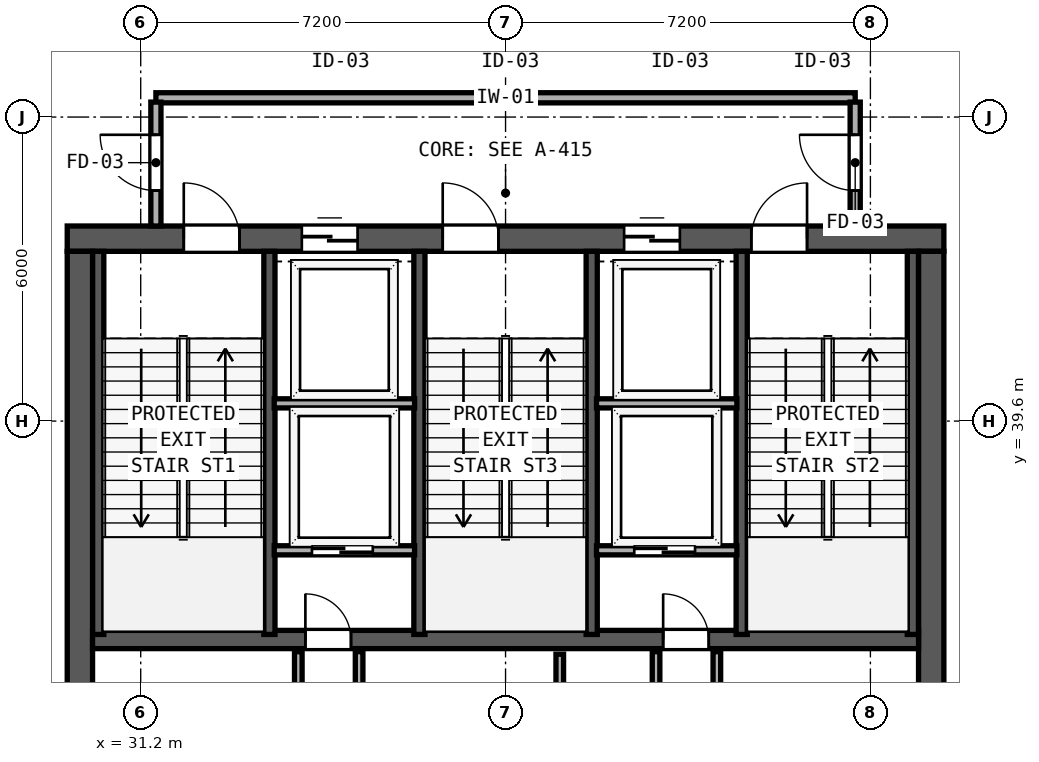
"""IFC4 building model, lengths in metres.
Left out: names, types, materials, properties, quantities, classifications, styles, units other than length and angle.
Written with IfcOpenShell. Run it as: python <this file> out.ifc"""

import sys

from ifc_helpers import new_model, si_unit, direction, frame, frame_2d, origin, place, context, subcontext, project, spatial, rectangle, extrude, element, fill, save


model = new_model("IFC4")
c1 = context("Model", 3, precision=1e-05, world=origin(), true_north=direction((0.0, 1.0)))
c2 = subcontext(c1, "Body", "Model", "MODEL_VIEW")
j1 = project(units=[si_unit("LENGTHUNIT", "METRE"), si_unit("PLANEANGLEUNIT", "RADIAN")], contexts=[c1])
p1 = place(None, origin())
s1 = spatial("IfcSite", under=j1, at=p1, CompositionType="ELEMENT")
p2 = place(p1, origin())
s2 = spatial("IfcBuilding", under=s1, at=p2, CompositionType="ELEMENT")
p3 = place(p2, frame((0.0, 0.0, 323.2)))
s3 = spatial("IfcBuildingStorey", under=s2, at=p3, CompositionType="ELEMENT", Elevation=323.2)
p4 = place(p3, frame((29.75, 43.2, 0.0), z_axis=(0.0, 0.0, 1.0), x_axis=(1.0, 0.0, 0.0)))
e1 = element("IfcWall", 1, at=p4, inside=s3, PredefinedType="SHEAR", context=c2, shape_type="SweptSolid", body=[
    extrude(rectangle(XDim=17.3, YDim=0.5, at=frame_2d((8.65, 0.0))), origin(), (0.0, 0.0, 1.0), 4.75),
])
p5 = place(p4, frame((2.3, 0.0, 0.0)))
e2 = element("IfcOpeningElement", 2, at=p5, cuts=e1, PredefinedType="OPENING", context=c2, shape_type="SweptSolid", body=[
    extrude(rectangle(XDim=1.1, YDim=2.15, at=frame_2d((0.55, 1.075))), frame((0.0, 0.26, 0.0), z_axis=(0.0, -1.0, 0.0), x_axis=(1.0, 0.0, 0.0)), (0.0, 0.0, 1.0), 0.52),
])
p6 = place(p4, frame((7.41, 0.0, 0.0)))
e3 = element("IfcOpeningElement", 3, at=p6, cuts=e1, PredefinedType="OPENING", context=c2, shape_type="SweptSolid", body=[
    extrude(rectangle(XDim=1.1, YDim=2.15, at=frame_2d((0.55, 1.075))), frame((0.0, 0.26, 0.0), z_axis=(0.0, -1.0, 0.0), x_axis=(1.0, 0.0, 0.0)), (0.0, 0.0, 1.0), 0.52),
])
p7 = place(p4, frame((13.5, 0.0, 0.0)))
e4 = element("IfcOpeningElement", 4, at=p7, cuts=e1, PredefinedType="OPENING", context=c2, shape_type="SweptSolid", body=[
    extrude(rectangle(XDim=1.1, YDim=2.15, at=frame_2d((0.55, 1.075))), frame((0.0, 0.26, 0.0), z_axis=(0.0, -1.0, 0.0), x_axis=(1.0, 0.0, 0.0)), (0.0, 0.0, 1.0), 0.52),
])
p8 = place(p4, frame((4.63, 0.0, 0.0)))
e5 = element("IfcOpeningElement", 5, at=p8, cuts=e1, PredefinedType="OPENING", context=c2, shape_type="SweptSolid", body=[
    extrude(rectangle(XDim=1.1, YDim=2.2, at=frame_2d((0.55, 1.1))), frame((0.0, 0.26, 0.0), z_axis=(0.0, -1.0, 0.0), x_axis=(1.0, 0.0, 0.0)), (0.0, 0.0, 1.0), 0.52),
])
p9 = place(p4, frame((10.99, 0.0, 0.0)))
e6 = element("IfcOpeningElement", 6, at=p9, cuts=e1, PredefinedType="OPENING", context=c2, shape_type="SweptSolid", body=[
    extrude(rectangle(XDim=1.1, YDim=2.2, at=frame_2d((0.55, 1.1))), frame((0.0, 0.26, 0.0), z_axis=(0.0, -1.0, 0.0), x_axis=(1.0, 0.0, 0.0)), (0.0, 0.0, 1.0), 0.52),
])
for number, where, z_axis, x_axis in (
    (7, (30.0, 32.8, 0.0), (0.0, 0.0, 1.0), (0.0, 1.0, 0.0)),
    (8, (46.8, 32.8, 0.0), (0.0, 0.0, 1.0), (0.0, 1.0, 0.0)),
):
    element("IfcWall", number, at=place(p3, frame(where, z_axis=z_axis, x_axis=x_axis)), inside=s3, PredefinedType="SHEAR", context=c2, shape_type="SweptSolid", body=[
        extrude(rectangle(XDim=10.15, YDim=0.5, at=frame_2d((5.075, 0.0))), origin(), (0.0, 0.0, 1.0), 4.75),
    ])
p10 = place(p3, frame((30.25, 35.29, 0.0), z_axis=(0.0, 0.0, 1.0), x_axis=(1.0, 0.0, 0.0)))
e9 = element("IfcWall", 9, at=p10, inside=s3, PredefinedType="SHEAR", context=c2, shape_type="SweptSolid", body=[
    extrude(rectangle(XDim=16.3, YDim=0.36, at=frame_2d((8.15, 0.0))), origin(), (0.0, 0.0, 1.0), 4.75),
])
p11 = place(p10, frame((5.1, 0.0, 0.0), z_axis=(0.0, 0.0, 1.0), x_axis=(-1.0, 0.0, 0.0)))
e10 = element("IfcOpeningElement", 10, at=p11, cuts=e9, PredefinedType="OPENING", context=c2, shape_type="SweptSolid", body=[
    extrude(rectangle(XDim=0.9, YDim=2.1, at=frame_2d((0.45, 1.05))), frame((0.0, 0.19, 0.0), z_axis=(0.0, -1.0, 0.0), x_axis=(1.0, 0.0, 0.0)), (0.0, 0.0, 1.0), 0.38),
])
p12 = place(p10, frame((12.16, 0.0, 0.0), z_axis=(0.0, 0.0, 1.0), x_axis=(-1.0, 0.0, 0.0)))
e11 = element("IfcOpeningElement", 11, at=p12, cuts=e9, PredefinedType="OPENING", context=c2, shape_type="SweptSolid", body=[
    extrude(rectangle(XDim=0.9, YDim=2.1, at=frame_2d((0.45, 1.05))), frame((0.0, 0.19, 0.0), z_axis=(0.0, -1.0, 0.0), x_axis=(1.0, 0.0, 0.0)), (0.0, 0.0, 1.0), 0.38),
])
for number, where, z_axis, x_axis in (
    (12, (30.362, 35.39, 0.0), (0.0, 0.0, 1.0), (0.0, 1.0, 0.0)),
    (13, (33.74, 35.39, 0.0), (0.0, 0.0, 1.0), (0.0, 1.0, 0.0)),
    (14, (36.7, 35.39, 0.0), (0.0, 0.0, 1.0), (0.0, 1.0, 0.0)),
    (15, (40.1, 35.39, 0.0), (0.0, 0.0, 1.0), (0.0, 1.0, 0.0)),
    (16, (43.06, 35.39, 0.0), (0.0, 0.0, 1.0), (0.0, 1.0, 0.0)),
    (17, (46.438, 35.39, 0.0), (0.0, 0.0, 1.0), (0.0, 1.0, 0.0)),
):
    element("IfcWall", number, at=place(p3, frame(where, z_axis=z_axis, x_axis=x_axis)), inside=s3, PredefinedType="SHEAR", context=c2, shape_type="SweptSolid", body=[
        extrude(rectangle(XDim=7.56, YDim=0.22, at=frame_2d((3.78, 0.0))), origin(), (0.0, 0.0, 1.0), 4.75),
    ])
p13 = place(p3, frame((31.5, 45.98, 0.0), z_axis=(0.0, 0.0, 1.0), x_axis=(1.0, 0.0, 0.0)))
e18 = element("IfcWall", 18, at=p13, inside=s3, PredefinedType="SOLIDWALL", context=c2, shape_type="SweptSolid", body=[
    extrude(rectangle(XDim=13.8, YDim=0.2, at=frame_2d((6.9, 0.0))), origin(), (0.0, 0.0, 1.0), 4.75),
])
p14 = place(p3, frame((31.5, 43.45, 0.0), z_axis=(0.0, 0.0, 1.0), x_axis=(0.0, 1.0, 0.0)))
e19 = element("IfcWall", 19, at=p14, inside=s3, PredefinedType="SOLIDWALL", context=c2, shape_type="SweptSolid", body=[
    extrude(rectangle(XDim=2.445, YDim=0.2, at=frame_2d((1.223, 0.0))), origin(), (0.0, 0.0, 1.0), 4.75),
])
p15 = place(p14, frame((1.8, 0.0, 0.0), z_axis=(0.0, 0.0, 1.0), x_axis=(-1.0, 0.0, 0.0)))
e20 = element("IfcOpeningElement", 20, at=p15, cuts=e19, PredefinedType="OPENING", context=c2, shape_type="SweptSolid", body=[
    extrude(rectangle(XDim=1.1, YDim=2.15, at=frame_2d((0.55, 1.075))), frame((0.0, 0.11, 0.0), z_axis=(0.0, -1.0, 0.0), x_axis=(1.0, 0.0, 0.0)), (0.0, 0.0, 1.0), 0.22),
])
p16 = place(p3, frame((45.3, 43.45, 0.0), z_axis=(0.0, 0.0, 1.0), x_axis=(0.0, 1.0, 0.0)))
e21 = element("IfcWall", 21, at=p16, inside=s3, PredefinedType="SOLIDWALL", context=c2, shape_type="SweptSolid", body=[
    extrude(rectangle(XDim=2.445, YDim=0.2, at=frame_2d((1.223, 0.0))), origin(), (0.0, 0.0, 1.0), 4.75),
])
p17 = place(p16, frame((0.7, 0.0, 0.0)))
e22 = element("IfcOpeningElement", 22, at=p17, cuts=e21, PredefinedType="OPENING", context=c2, shape_type="SweptSolid", body=[
    extrude(rectangle(XDim=1.1, YDim=2.15, at=frame_2d((0.55, 1.075))), frame((0.0, 0.11, 0.0), z_axis=(0.0, -1.0, 0.0), x_axis=(1.0, 0.0, 0.0)), (0.0, 0.0, 1.0), 0.22),
])
for number, where, z_axis, x_axis in (
    (23, (33.835, 39.95, 0.0), (0.0, 0.0, 1.0), (1.0, 0.0, 0.0)),
    (24, (40.195, 39.95, 0.0), (0.0, 0.0, 1.0), (1.0, 0.0, 0.0)),
):
    element("IfcWall", number, at=place(p3, frame(where, z_axis=z_axis, x_axis=x_axis)), inside=s3, PredefinedType="SOLIDWALL", context=c2, shape_type="SweptSolid", body=[
        extrude(rectangle(XDim=2.77, YDim=0.18, at=frame_2d((1.385, 0.0))), origin(), (0.0, 0.0, 1.0), 4.75),
    ])
p18 = place(p3, frame((33.835, 37.05, 0.0), z_axis=(0.0, 0.0, 1.0), x_axis=(1.0, 0.0, 0.0)))
e25 = element("IfcWall", 25, at=p18, inside=s3, PredefinedType="SOLIDWALL", context=c2, shape_type="SweptSolid", body=[
    extrude(rectangle(XDim=2.77, YDim=0.18, at=frame_2d((1.385, 0.0))), origin(), (0.0, 0.0, 1.0), 4.75),
])
p19 = place(p18, frame((1.945, 0.0, 0.0), z_axis=(0.0, 0.0, 1.0), x_axis=(-1.0, 0.0, 0.0)))
e26 = element("IfcOpeningElement", 26, at=p19, cuts=e25, PredefinedType="OPENING", context=c2, shape_type="SweptSolid", body=[
    extrude(rectangle(XDim=1.2, YDim=2.2, at=frame_2d((0.6, 1.1))), frame((0.0, 0.1, 0.0), z_axis=(0.0, -1.0, 0.0), x_axis=(1.0, 0.0, 0.0)), (0.0, 0.0, 1.0), 0.2),
])
for number, where, z_axis, x_axis in (
    (27, (34.31, 32.88, 0.0), (0.0, 0.0, 1.0), (0.0, 1.0, 0.0)),
    (28, (35.51, 32.88, 0.0), (0.0, 0.0, 1.0), (0.0, 1.0, 0.0)),
):
    element("IfcWall", number, at=place(p3, frame(where, z_axis=z_axis, x_axis=x_axis)), inside=s3, PredefinedType="SOLIDWALL", context=c2, shape_type="SweptSolid", body=[
        extrude(rectangle(XDim=2.17, YDim=0.15, at=frame_2d((1.085, 0.0))), origin(), (0.0, 0.0, 1.0), 4.75),
    ])
p20 = place(p3, frame((40.195, 37.05, 0.0), z_axis=(0.0, 0.0, 1.0), x_axis=(1.0, 0.0, 0.0)))
e29 = element("IfcWall", 29, at=p20, inside=s3, PredefinedType="SOLIDWALL", context=c2, shape_type="SweptSolid", body=[
    extrude(rectangle(XDim=2.77, YDim=0.18, at=frame_2d((1.385, 0.0))), origin(), (0.0, 0.0, 1.0), 4.75),
])
p21 = place(p20, frame((1.945, 0.0, 0.0), z_axis=(0.0, 0.0, 1.0), x_axis=(-1.0, 0.0, 0.0)))
e30 = element("IfcOpeningElement", 30, at=p21, cuts=e29, PredefinedType="OPENING", context=c2, shape_type="SweptSolid", body=[
    extrude(rectangle(XDim=1.2, YDim=2.2, at=frame_2d((0.6, 1.1))), frame((0.0, 0.1, 0.0), z_axis=(0.0, -1.0, 0.0), x_axis=(1.0, 0.0, 0.0)), (0.0, 0.0, 1.0), 0.2),
])
for number, where, z_axis, x_axis in (
    (31, (41.37, 32.88, 0.0), (0.0, 0.0, 1.0), (0.0, 1.0, 0.0)),
    (32, (42.57, 32.88, 0.0), (0.0, 0.0, 1.0), (0.0, 1.0, 0.0)),
):
    element("IfcWall", number, at=place(p3, frame(where, z_axis=z_axis, x_axis=x_axis)), inside=s3, PredefinedType="SOLIDWALL", context=c2, shape_type="SweptSolid", body=[
        extrude(rectangle(XDim=2.17, YDim=0.15, at=frame_2d((1.085, 0.0))), origin(), (0.0, 0.0, 1.0), 4.75),
    ])
p22 = place(p3, frame((39.47, 32.95, 0.0), z_axis=(0.0, 0.0, 1.0), x_axis=(0.0, 1.0, 0.0)))
e33 = element("IfcWall", 33, at=p22, inside=s3, PredefinedType="SOLIDWALL", context=c2, shape_type="SweptSolid", body=[
    extrude(rectangle(XDim=2.05, YDim=0.15, at=frame_2d((1.025, 0.0))), origin(), (0.0, 0.0, 1.0), 4.75),
])
p23 = place(p5, origin())
e34 = element("IfcDoor", 34, at=p23, inside=s3, OperationType="SINGLE_SWING_LEFT", PredefinedType="DOOR", context=c2, shape_type="SweptSolid", body=[
    extrude(rectangle(XDim=1.1, YDim=2.15, at=frame_2d((0.55, 1.075))), frame((0.0, 0.185, 0.0), z_axis=(0.0, -1.0, 0.0), x_axis=(1.0, 0.0, 0.0)), (0.0, 0.0, 1.0), 0.05),
])
fill(e2, e34)
p24 = place(p6, origin())
e35 = element("IfcDoor", 35, at=p24, inside=s3, OperationType="SINGLE_SWING_LEFT", PredefinedType="DOOR", context=c2, shape_type="SweptSolid", body=[
    extrude(rectangle(XDim=1.1, YDim=2.15, at=frame_2d((0.55, 1.075))), frame((0.0, 0.185, 0.0), z_axis=(0.0, -1.0, 0.0), x_axis=(1.0, 0.0, 0.0)), (0.0, 0.0, 1.0), 0.05),
])
fill(e3, e35)
p25 = place(p7, origin())
e36 = element("IfcDoor", 36, at=p25, inside=s3, OperationType="SINGLE_SWING_RIGHT", PredefinedType="DOOR", context=c2, shape_type="SweptSolid", body=[
    extrude(rectangle(XDim=1.1, YDim=2.15, at=frame_2d((0.55, 1.075))), frame((0.0, 0.185, 0.0), z_axis=(0.0, -1.0, 0.0), x_axis=(1.0, 0.0, 0.0)), (0.0, 0.0, 1.0), 0.05),
])
fill(e4, e36)
p26 = place(p15, origin())
e37 = element("IfcDoor", 37, at=p26, inside=s3, OperationType="SINGLE_SWING_LEFT", PredefinedType="DOOR", context=c2, shape_type="SweptSolid", body=[
    extrude(rectangle(XDim=1.1, YDim=2.15, at=frame_2d((0.55, 1.075))), frame((0.0, 0.025, 0.0), z_axis=(0.0, -1.0, 0.0), x_axis=(1.0, 0.0, 0.0)), (0.0, 0.0, 1.0), 0.05),
])
fill(e20, e37)
p27 = place(p17, origin())
e38 = element("IfcDoor", 38, at=p27, inside=s3, OperationType="SINGLE_SWING_RIGHT", PredefinedType="DOOR", context=c2, shape_type="SweptSolid", body=[
    extrude(rectangle(XDim=1.1, YDim=2.15, at=frame_2d((0.55, 1.075))), frame((0.0, 0.025, 0.0), z_axis=(0.0, -1.0, 0.0), x_axis=(1.0, 0.0, 0.0)), (0.0, 0.0, 1.0), 0.05),
])
fill(e22, e38)
p28 = place(p8, origin())
e39 = element("IfcDoor", 39, at=p28, inside=s3, OperationType="SLIDING_TO_LEFT", PredefinedType="DOOR", context=c2, shape_type="SweptSolid", body=[
    extrude(rectangle(XDim=1.1, YDim=2.2, at=frame_2d((0.55, 1.1))), frame((0.0, 0.185, 0.0), z_axis=(0.0, -1.0, 0.0), x_axis=(1.0, 0.0, 0.0)), (0.0, 0.0, 1.0), 0.05),
])
fill(e5, e39)
p29 = place(p9, origin())
e40 = element("IfcDoor", 40, at=p29, inside=s3, OperationType="SLIDING_TO_LEFT", PredefinedType="DOOR", context=c2, shape_type="SweptSolid", body=[
    extrude(rectangle(XDim=1.1, YDim=2.2, at=frame_2d((0.55, 1.1))), frame((0.0, 0.185, 0.0), z_axis=(0.0, -1.0, 0.0), x_axis=(1.0, 0.0, 0.0)), (0.0, 0.0, 1.0), 0.05),
])
fill(e6, e40)
p30 = place(p19, origin())
e41 = element("IfcDoor", 41, at=p30, inside=s3, OperationType="SLIDING_TO_RIGHT", PredefinedType="DOOR", context=c2, shape_type="SweptSolid", body=[
    extrude(rectangle(XDim=1.2, YDim=2.2, at=frame_2d((0.6, 1.1))), frame((0.0, 0.025, 0.0), z_axis=(0.0, -1.0, 0.0), x_axis=(1.0, 0.0, 0.0)), (0.0, 0.0, 1.0), 0.05),
])
fill(e26, e41)
p31 = place(p11, origin())
e42 = element("IfcDoor", 42, at=p31, inside=s3, OperationType="SINGLE_SWING_RIGHT", PredefinedType="DOOR", context=c2, shape_type="SweptSolid", body=[
    extrude(rectangle(XDim=0.9, YDim=2.1, at=frame_2d((0.45, 1.05))), frame((0.0, 0.025, 0.0), z_axis=(0.0, -1.0, 0.0), x_axis=(1.0, 0.0, 0.0)), (0.0, 0.0, 1.0), 0.05),
])
fill(e10, e42)
p32 = place(p21, origin())
e43 = element("IfcDoor", 43, at=p32, inside=s3, OperationType="SLIDING_TO_RIGHT", PredefinedType="DOOR", context=c2, shape_type="SweptSolid", body=[
    extrude(rectangle(XDim=1.2, YDim=2.2, at=frame_2d((0.6, 1.1))), frame((0.0, 0.025, 0.0), z_axis=(0.0, -1.0, 0.0), x_axis=(1.0, 0.0, 0.0)), (0.0, 0.0, 1.0), 0.05),
])
fill(e30, e43)
p33 = place(p12, origin())
e44 = element("IfcDoor", 44, at=p33, inside=s3, OperationType="SINGLE_SWING_RIGHT", PredefinedType="DOOR", context=c2, shape_type="SweptSolid", body=[
    extrude(rectangle(XDim=0.9, YDim=2.1, at=frame_2d((0.45, 1.05))), frame((0.0, 0.025, 0.0), z_axis=(0.0, -1.0, 0.0), x_axis=(1.0, 0.0, 0.0)), (0.0, 0.0, 1.0), 0.05),
])
fill(e11, e44)
save(model, sys.argv[1])
